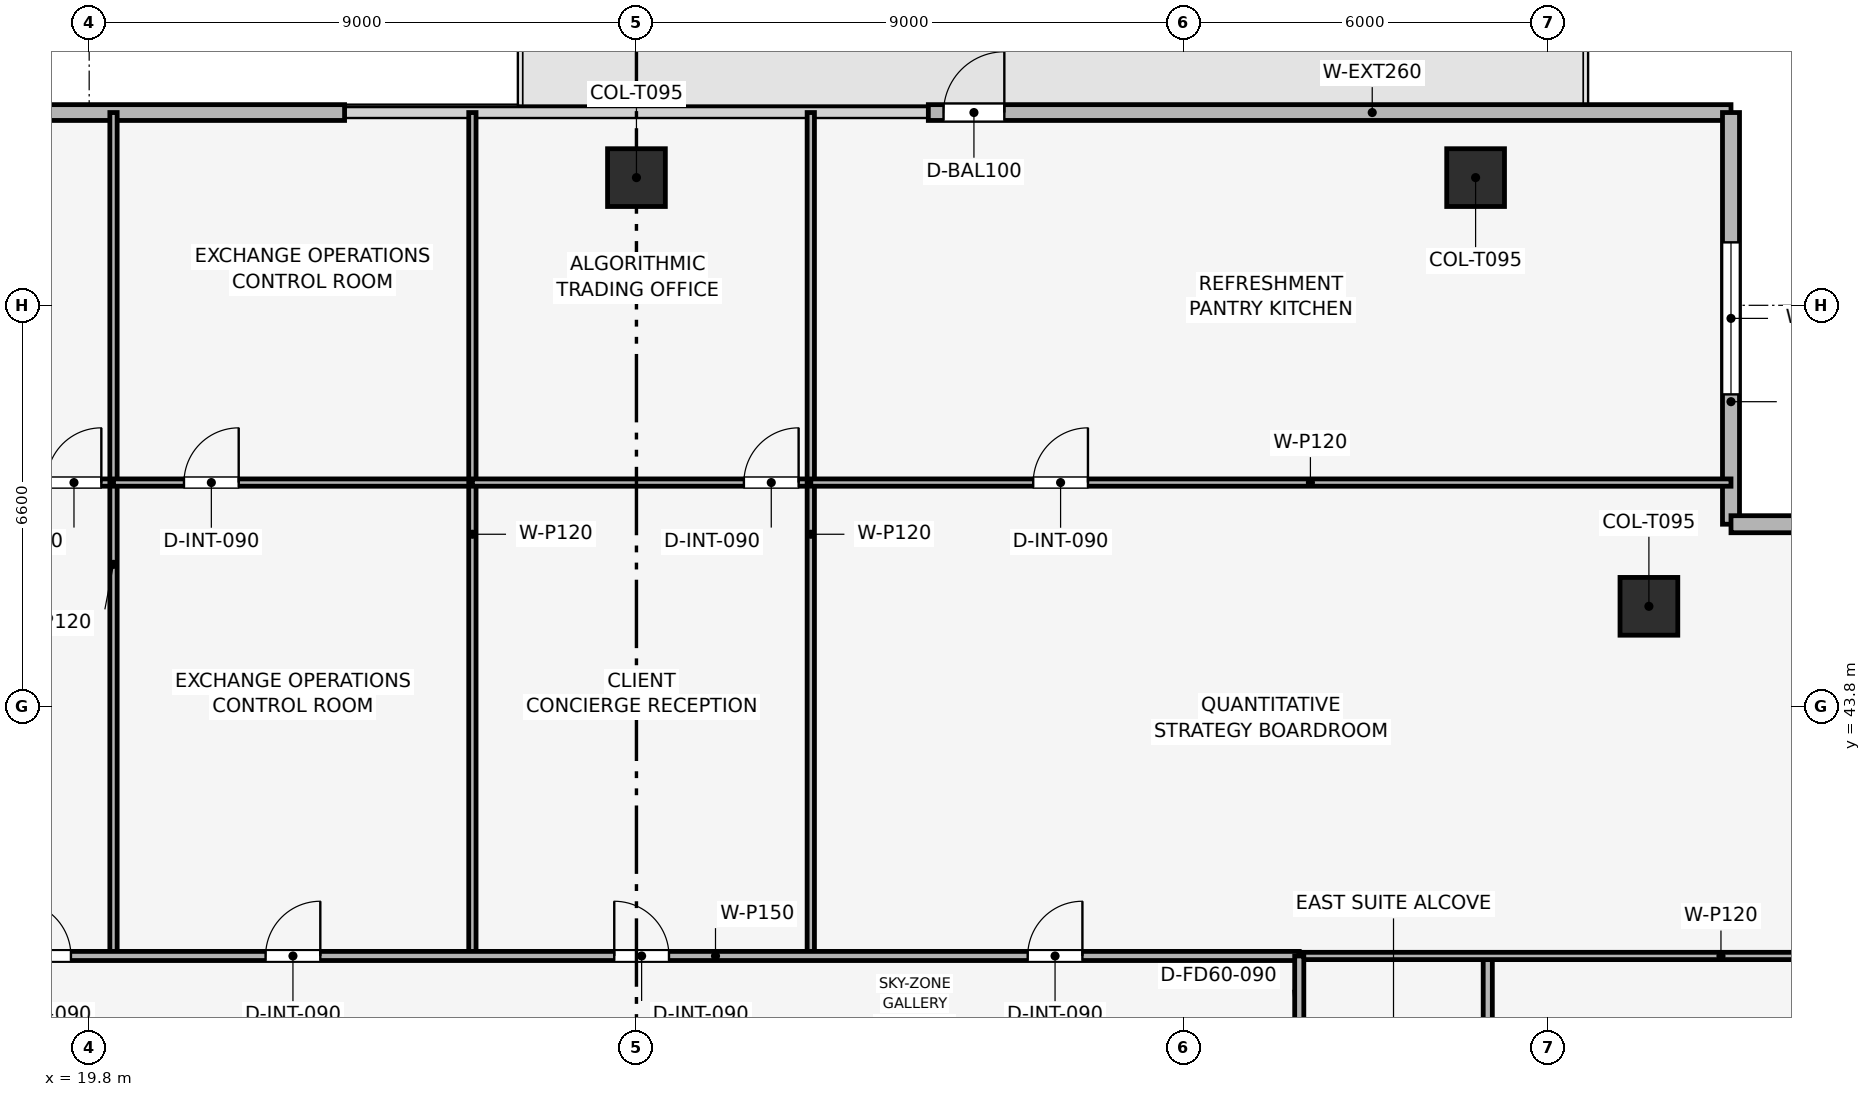
"""IFC4 building model, lengths in metres.
Left out: names, types, materials, properties, quantities, classifications, styles, units other than length and angle.
Written with IfcOpenShell. Run it as: python <this file> out.ifc"""

import sys

from ifc_helpers import new_model, si_unit, direction, frame, frame_2d, origin, origin_2d, place, context, subcontext, project, spatial, rectangle, extrude, element, fill, save


model = new_model("IFC4")
c1 = context("Model", 3, precision=1e-05, world=origin(), true_north=direction((0.0, 1.0)))
c2 = subcontext(c1, "Body", "Model", "MODEL_VIEW")
j1 = project(units=[si_unit("LENGTHUNIT", "METRE"), si_unit("PLANEANGLEUNIT", "RADIAN")], contexts=[c1])
p1 = place(None, origin())
s1 = spatial("IfcSite", under=j1, at=p1, CompositionType="ELEMENT")
p2 = place(p1, origin())
s2 = spatial("IfcBuilding", under=s1, at=p2, CompositionType="ELEMENT")
p3 = place(p2, frame((0.0, 0.0, 254.1)))
s3 = spatial("IfcBuildingStorey", under=s2, at=p3, CompositionType="ELEMENT", Elevation=254.1)
for number, where, z_axis, x_axis in (
    (1, (42.6, 52.5, 0.003), (0.0, 0.0, 1.0), (1.0, 0.0, 0.0)),
    (2, (28.8, 52.5, 0.003), (0.0, 0.0, 1.0), (1.0, 0.0, 0.0)),
    (3, (45.45, 45.45, 0.003), (0.0, 0.0, 1.0), (1.0, 0.0, 0.0)),
):
    element("IfcColumn", number, at=place(p3, frame(where, z_axis=z_axis, x_axis=x_axis)), inside=s3, PredefinedType="COLUMN", context=c2, shape_type="SweptSolid", body=[
        extrude(rectangle(XDim=0.95, YDim=0.95, at=origin_2d()), origin(), (0.0, 0.0, 1.0), 3.494),
    ])
p4 = place(p3, frame((10.8, 53.57, 0.0), z_axis=(0.0, 0.0, 1.0), x_axis=(1.0, 0.0, 0.0)))
e4 = element("IfcWall", 4, at=p4, inside=s3, PredefinedType="SOLIDWALL", context=c2, shape_type="SweptSolid", body=[
    extrude(rectangle(XDim=13.2, YDim=0.26, at=frame_2d((6.6, 0.0))), origin(), (0.0, 0.0, 1.0), 3.5),
])
p5 = place(p4, frame((0.25, 0.0, 0.9)))
e5 = element("IfcOpeningElement", 5, at=p5, cuts=e4, PredefinedType="OPENING", context=c2, shape_type="SweptSolid", body=[
    extrude(rectangle(XDim=1.2, YDim=2.1, at=frame_2d((0.6, 1.05))), frame((0.0, 0.14, 0.0), z_axis=(0.0, -1.0, 0.0), x_axis=(1.0, 0.0, 0.0)), (0.0, 0.0, 1.0), 0.28),
])
p6 = place(p3, frame((33.6, 53.57, 0.0), z_axis=(0.0, 0.0, 1.0), x_axis=(1.0, 0.0, 0.0)))
e6 = element("IfcWall", 6, at=p6, inside=s3, PredefinedType="SOLIDWALL", context=c2, shape_type="SweptSolid", body=[
    extrude(rectangle(XDim=13.2, YDim=0.26, at=frame_2d((6.6, 0.0))), origin(), (0.0, 0.0, 1.0), 3.5),
])
p7 = place(p6, frame((0.25, 0.0, 0.0)))
e7 = element("IfcOpeningElement", 7, at=p7, cuts=e6, PredefinedType="OPENING", context=c2, shape_type="SweptSolid", body=[
    extrude(rectangle(XDim=1.0, YDim=2.2, at=frame_2d((0.5, 1.1))), frame((0.0, 0.14, 0.0), z_axis=(0.0, -1.0, 0.0), x_axis=(1.0, 0.0, 0.0)), (0.0, 0.0, 1.0), 0.28),
])
p8 = place(p3, frame((46.8, 53.57, 0.0), z_axis=(0.0, 0.0, 1.0), x_axis=(0.0, -1.0, 0.0)))
e8 = element("IfcWall", 8, at=p8, inside=s3, PredefinedType="SOLIDWALL", context=c2, shape_type="SweptSolid", body=[
    extrude(rectangle(XDim=6.77, YDim=0.28, at=frame_2d((3.385, 0.0))), origin(), (0.0, 0.0, 1.0), 3.5),
])
p9 = place(p8, frame((2.135, 0.0, 0.9)))
e9 = element("IfcOpeningElement", 9, at=p9, cuts=e8, PredefinedType="OPENING", context=c2, shape_type="SweptSolid", body=[
    extrude(rectangle(XDim=2.5, YDim=1.9, at=frame_2d((1.25, 0.95))), frame((0.0, 0.15, 0.0), z_axis=(0.0, -1.0, 0.0), x_axis=(1.0, 0.0, 0.0)), (0.0, 0.0, 1.0), 0.3),
])
p10 = place(p3, frame((46.8, 46.8, 0.0), z_axis=(0.0, 0.0, 1.0), x_axis=(1.0, 0.0, 0.0)))
e10 = element("IfcWall", 10, at=p10, inside=s3, PredefinedType="SOLIDWALL", context=c2, shape_type="SweptSolid", body=[
    extrude(rectangle(XDim=6.77, YDim=0.28, at=frame_2d((3.385, 0.0))), origin(), (0.0, 0.0, 1.0), 3.5),
])
p11 = place(p10, frame((2.135, 0.0, 0.9)))
e11 = element("IfcOpeningElement", 11, at=p11, cuts=e10, PredefinedType="OPENING", context=c2, shape_type="SweptSolid", body=[
    extrude(rectangle(XDim=2.5, YDim=1.9, at=frame_2d((1.25, 0.95))), frame((0.0, 0.15, 0.0), z_axis=(0.0, -1.0, 0.0), x_axis=(1.0, 0.0, 0.0)), (0.0, 0.0, 1.0), 0.3),
])
p12 = place(p3, frame((10.8, 47.485, 0.0), z_axis=(0.0, 0.0, 1.0), x_axis=(1.0, 0.0, 0.0)))
e12 = element("IfcWall", 12, at=p12, inside=s3, PredefinedType="PARTITIONING", context=c2, shape_type="SweptSolid", body=[
    extrude(rectangle(XDim=9.4, YDim=0.12, at=frame_2d((4.7, 0.0))), origin(), (0.0, 0.0, 1.0), 3.085),
])
p13 = place(p12, frame((8.3, 0.0, 0.0)))
e13 = element("IfcOpeningElement", 13, at=p13, cuts=e12, PredefinedType="OPENING", context=c2, shape_type="SweptSolid", body=[
    extrude(rectangle(XDim=0.9, YDim=2.1, at=frame_2d((0.45, 1.05))), frame((0.0, 0.07, 0.0), z_axis=(0.0, -1.0, 0.0), x_axis=(1.0, 0.0, 0.0)), (0.0, 0.0, 1.0), 0.14),
])
p14 = place(p3, frame((20.2, 39.7, 0.0), z_axis=(0.0, 0.0, 1.0), x_axis=(0.0, 1.0, 0.0)))
e14 = element("IfcWall", 14, at=p14, inside=s3, PredefinedType="PARTITIONING", context=c2, shape_type="SweptSolid", body=[
    extrude(rectangle(XDim=13.87, YDim=0.12, at=frame_2d((6.935, 0.0))), origin(), (0.0, 0.0, 1.0), 3.085),
])
p15 = place(p3, frame((20.2, 47.485, 0.0), z_axis=(0.0, 0.0, 1.0), x_axis=(1.0, 0.0, 0.0)))
e15 = element("IfcWall", 15, at=p15, inside=s3, PredefinedType="PARTITIONING", context=c2, shape_type="SweptSolid", body=[
    extrude(rectangle(XDim=5.902, YDim=0.12, at=frame_2d((2.951, 0.0))), origin(), (0.0, 0.0, 1.0), 3.085),
])
p16 = place(p15, frame((1.159, 0.0, 0.0)))
e16 = element("IfcOpeningElement", 16, at=p16, cuts=e15, PredefinedType="OPENING", context=c2, shape_type="SweptSolid", body=[
    extrude(rectangle(XDim=0.9, YDim=2.1, at=frame_2d((0.45, 1.05))), frame((0.0, 0.07, 0.0), z_axis=(0.0, -1.0, 0.0), x_axis=(1.0, 0.0, 0.0)), (0.0, 0.0, 1.0), 0.14),
])
p17 = place(p3, frame((26.102, 39.7, 0.0), z_axis=(0.0, 0.0, 1.0), x_axis=(0.0, 1.0, 0.0)))
e17 = element("IfcWall", 17, at=p17, inside=s3, PredefinedType="PARTITIONING", context=c2, shape_type="SweptSolid", body=[
    extrude(rectangle(XDim=13.87, YDim=0.12, at=frame_2d((6.935, 0.0))), origin(), (0.0, 0.0, 1.0), 3.085),
])
p18 = place(p3, frame((26.102, 47.485, 0.0), z_axis=(0.0, 0.0, 1.0), x_axis=(1.0, 0.0, 0.0)))
e18 = element("IfcWall", 18, at=p18, inside=s3, PredefinedType="PARTITIONING", context=c2, shape_type="SweptSolid", body=[
    extrude(rectangle(XDim=5.565, YDim=0.12, at=frame_2d((2.782, 0.0))), origin(), (0.0, 0.0, 1.0), 3.085),
])
p19 = place(p18, frame((4.465, 0.0, 0.0)))
e19 = element("IfcOpeningElement", 19, at=p19, cuts=e18, PredefinedType="OPENING", context=c2, shape_type="SweptSolid", body=[
    extrude(rectangle(XDim=0.9, YDim=2.1, at=frame_2d((0.45, 1.05))), frame((0.0, 0.07, 0.0), z_axis=(0.0, -1.0, 0.0), x_axis=(1.0, 0.0, 0.0)), (0.0, 0.0, 1.0), 0.14),
])
p20 = place(p3, frame((31.667, 39.7, 0.0), z_axis=(0.0, 0.0, 1.0), x_axis=(0.0, 1.0, 0.0)))
e20 = element("IfcWall", 20, at=p20, inside=s3, PredefinedType="PARTITIONING", context=c2, shape_type="SweptSolid", body=[
    extrude(rectangle(XDim=13.87, YDim=0.12, at=frame_2d((6.935, 0.0))), origin(), (0.0, 0.0, 1.0), 3.085),
])
p21 = place(p3, frame((31.667, 47.485, 0.0), z_axis=(0.0, 0.0, 1.0), x_axis=(1.0, 0.0, 0.0)))
e21 = element("IfcWall", 21, at=p21, inside=s3, PredefinedType="PARTITIONING", context=c2, shape_type="SweptSolid", body=[
    extrude(rectangle(XDim=15.133, YDim=0.12, at=frame_2d((7.566, 0.0))), origin(), (0.0, 0.0, 1.0), 3.085),
])
p22 = place(p21, frame((3.658, 0.0, 0.0)))
e22 = element("IfcOpeningElement", 22, at=p22, cuts=e21, PredefinedType="OPENING", context=c2, shape_type="SweptSolid", body=[
    extrude(rectangle(XDim=0.9, YDim=2.1, at=frame_2d((0.45, 1.05))), frame((0.0, 0.07, 0.0), z_axis=(0.0, -1.0, 0.0), x_axis=(1.0, 0.0, 0.0)), (0.0, 0.0, 1.0), 0.14),
])
p23 = place(p3, frame((42.8, 28.0, 0.0), z_axis=(0.0, 0.0, 1.0), x_axis=(0.0, 1.0, 0.0)))
e23 = element("IfcWall", 23, at=p23, inside=s3, PredefinedType="PARTITIONING", context=c2, shape_type="SweptSolid", body=[
    extrude(rectangle(XDim=11.7, YDim=0.15, at=frame_2d((5.85, 0.0))), origin(), (0.0, 0.0, 1.0), 3.085),
])
p24 = place(p23, frame((9.6, 0.0, 0.0)))
e24 = element("IfcOpeningElement", 24, at=p24, cuts=e23, PredefinedType="OPENING", context=c2, shape_type="SweptSolid", body=[
    extrude(rectangle(XDim=0.9, YDim=2.1, at=frame_2d((0.45, 1.05))), frame((0.0, 0.085, 0.0), z_axis=(0.0, -1.0, 0.0), x_axis=(1.0, 0.0, 0.0)), (0.0, 0.0, 1.0), 0.17),
])
p25 = place(p3, frame((39.7, 39.7, 0.0), z_axis=(0.0, 0.0, 1.0), x_axis=(1.0, 0.0, 0.0)))
e25 = element("IfcWall", 25, at=p25, inside=s3, PredefinedType="PARTITIONING", context=c2, shape_type="SweptSolid", body=[
    extrude(rectangle(XDim=13.87, YDim=0.12, at=frame_2d((6.935, 0.0))), origin(), (0.0, 0.0, 1.0), 3.085),
])
p26 = place(p3, frame((17.9, 39.7, 0.0), z_axis=(0.0, 0.0, 1.0), x_axis=(1.0, 0.0, 0.0)))
e26 = element("IfcWall", 26, at=p26, inside=s3, PredefinedType="PARTITIONING", context=c2, shape_type="SweptSolid", body=[
    extrude(rectangle(XDim=21.8, YDim=0.15, at=frame_2d((10.9, 0.0))), origin(), (0.0, 0.0, 1.0), 3.085),
])
p27 = place(p26, frame((0.7, 0.0, 0.0)))
e27 = element("IfcOpeningElement", 27, at=p27, cuts=e26, PredefinedType="OPENING", context=c2, shape_type="SweptSolid", body=[
    extrude(rectangle(XDim=0.9, YDim=2.1, at=frame_2d((0.45, 1.05))), frame((0.0, 0.085, 0.0), z_axis=(0.0, -1.0, 0.0), x_axis=(1.0, 0.0, 0.0)), (0.0, 0.0, 1.0), 0.17),
])
p28 = place(p26, frame((4.801, 0.0, 0.0)))
e28 = element("IfcOpeningElement", 28, at=p28, cuts=e26, PredefinedType="OPENING", context=c2, shape_type="SweptSolid", body=[
    extrude(rectangle(XDim=0.9, YDim=2.1, at=frame_2d((0.45, 1.05))), frame((0.0, 0.085, 0.0), z_axis=(0.0, -1.0, 0.0), x_axis=(1.0, 0.0, 0.0)), (0.0, 0.0, 1.0), 0.17),
])
p29 = place(p26, frame((10.535, 0.0, 0.0)))
e29 = element("IfcOpeningElement", 29, at=p29, cuts=e26, PredefinedType="OPENING", context=c2, shape_type="SweptSolid", body=[
    extrude(rectangle(XDim=0.9, YDim=2.1, at=frame_2d((0.45, 1.05))), frame((0.0, 0.085, 0.0), z_axis=(0.0, -1.0, 0.0), x_axis=(1.0, 0.0, 0.0)), (0.0, 0.0, 1.0), 0.17),
])
p30 = place(p26, frame((17.334, 0.0, 0.0)))
e30 = element("IfcOpeningElement", 30, at=p30, cuts=e26, PredefinedType="OPENING", context=c2, shape_type="SweptSolid", body=[
    extrude(rectangle(XDim=0.9, YDim=2.1, at=frame_2d((0.45, 1.05))), frame((0.0, 0.085, 0.0), z_axis=(0.0, -1.0, 0.0), x_axis=(1.0, 0.0, 0.0)), (0.0, 0.0, 1.0), 0.17),
])
p31 = place(p3, frame((39.7, 24.4, 0.0), z_axis=(0.0, 0.0, 1.0), x_axis=(0.0, 1.0, 0.0)))
e31 = element("IfcWall", 31, at=p31, inside=s3, PredefinedType="PARTITIONING", context=c2, shape_type="SweptSolid", body=[
    extrude(rectangle(XDim=15.3, YDim=0.15, at=frame_2d((7.65, 0.0))), origin(), (0.0, 0.0, 1.0), 3.085),
])
p32 = place(p31, frame((1.35, 0.0, 0.0)))
e32 = element("IfcOpeningElement", 32, at=p32, cuts=e31, PredefinedType="OPENING", context=c2, shape_type="SweptSolid", body=[
    extrude(rectangle(XDim=0.9, YDim=2.1, at=frame_2d((0.45, 1.05))), frame((0.0, 0.085, 0.0), z_axis=(0.0, -1.0, 0.0), x_axis=(1.0, 0.0, 0.0)), (0.0, 0.0, 1.0), 0.17),
])
p33 = place(p31, frame((4.55, 0.0, 0.0)))
e33 = element("IfcOpeningElement", 33, at=p33, cuts=e31, PredefinedType="OPENING", context=c2, shape_type="SweptSolid", body=[
    extrude(rectangle(XDim=0.9, YDim=2.1, at=frame_2d((0.45, 1.05))), frame((0.0, 0.085, 0.0), z_axis=(0.0, -1.0, 0.0), x_axis=(1.0, 0.0, 0.0)), (0.0, 0.0, 1.0), 0.17),
])
p34 = place(p31, frame((7.45, 0.0, 0.0)))
e34 = element("IfcOpeningElement", 34, at=p34, cuts=e31, PredefinedType="OPENING", context=c2, shape_type="SweptSolid", body=[
    extrude(rectangle(XDim=0.9, YDim=2.1, at=frame_2d((0.45, 1.05))), frame((0.0, 0.085, 0.0), z_axis=(0.0, -1.0, 0.0), x_axis=(1.0, 0.0, 0.0)), (0.0, 0.0, 1.0), 0.17),
])
p35 = place(p31, frame((10.2, 0.0, 0.0)))
e35 = element("IfcOpeningElement", 35, at=p35, cuts=e31, PredefinedType="OPENING", context=c2, shape_type="SweptSolid", body=[
    extrude(rectangle(XDim=0.95, YDim=2.1, at=frame_2d((0.475, 1.05))), frame((0.0, 0.085, 0.0), z_axis=(0.0, -1.0, 0.0), x_axis=(1.0, 0.0, 0.0)), (0.0, 0.0, 1.0), 0.17),
])
p36 = place(p31, frame((13.2, 0.0, 0.0)))
e36 = element("IfcOpeningElement", 36, at=p36, cuts=e31, PredefinedType="OPENING", context=c2, shape_type="SweptSolid", body=[
    extrude(rectangle(XDim=0.9, YDim=2.1, at=frame_2d((0.45, 1.05))), frame((0.0, 0.085, 0.0), z_axis=(0.0, -1.0, 0.0), x_axis=(1.0, 0.0, 0.0)), (0.0, 0.0, 1.0), 0.17),
])
p37 = place(p7, origin())
e37 = element("IfcDoor", 37, at=p37, inside=s3, OperationType="SINGLE_SWING_RIGHT", PredefinedType="DOOR", context=c2, shape_type="SweptSolid", body=[
    extrude(rectangle(XDim=1.0, YDim=2.2, at=frame_2d((0.5, 1.1))), frame((0.0, 0.025, 0.0), z_axis=(0.0, -1.0, 0.0), x_axis=(1.0, 0.0, 0.0)), (0.0, 0.0, 1.0), 0.05),
])
fill(e7, e37)
p38 = place(p9, origin())
e38 = element("IfcWindow", 38, at=p38, inside=s3, PartitioningType="SINGLE_PANEL", PredefinedType="WINDOW", context=c2, shape_type="SweptSolid", body=[
    extrude(rectangle(XDim=2.5, YDim=1.9, at=frame_2d((1.25, 0.95))), frame((0.0, 0.03, 0.0), z_axis=(0.0, -1.0, 0.0), x_axis=(1.0, 0.0, 0.0)), (0.0, 0.0, 1.0), 0.06),
])
fill(e9, e38)
p39 = place(p13, origin())
e39 = element("IfcDoor", 39, at=p39, inside=s3, OperationType="SINGLE_SWING_RIGHT", PredefinedType="DOOR", context=c2, shape_type="SweptSolid", body=[
    extrude(rectangle(XDim=0.9, YDim=2.1, at=frame_2d((0.45, 1.05))), frame((0.0, 0.025, 0.0), z_axis=(0.0, -1.0, 0.0), x_axis=(1.0, 0.0, 0.0)), (0.0, 0.0, 1.0), 0.05),
])
fill(e13, e39)
p40 = place(p16, origin())
e40 = element("IfcDoor", 40, at=p40, inside=s3, OperationType="SINGLE_SWING_RIGHT", PredefinedType="DOOR", context=c2, shape_type="SweptSolid", body=[
    extrude(rectangle(XDim=0.9, YDim=2.1, at=frame_2d((0.45, 1.05))), frame((0.0, 0.025, 0.0), z_axis=(0.0, -1.0, 0.0), x_axis=(1.0, 0.0, 0.0)), (0.0, 0.0, 1.0), 0.05),
])
fill(e16, e40)
p41 = place(p19, origin())
e41 = element("IfcDoor", 41, at=p41, inside=s3, OperationType="SINGLE_SWING_RIGHT", PredefinedType="DOOR", context=c2, shape_type="SweptSolid", body=[
    extrude(rectangle(XDim=0.9, YDim=2.1, at=frame_2d((0.45, 1.05))), frame((0.0, 0.025, 0.0), z_axis=(0.0, -1.0, 0.0), x_axis=(1.0, 0.0, 0.0)), (0.0, 0.0, 1.0), 0.05),
])
fill(e19, e41)
p42 = place(p22, origin())
e42 = element("IfcDoor", 42, at=p42, inside=s3, OperationType="SINGLE_SWING_RIGHT", PredefinedType="DOOR", context=c2, shape_type="SweptSolid", body=[
    extrude(rectangle(XDim=0.9, YDim=2.1, at=frame_2d((0.45, 1.05))), frame((0.0, 0.025, 0.0), z_axis=(0.0, -1.0, 0.0), x_axis=(1.0, 0.0, 0.0)), (0.0, 0.0, 1.0), 0.05),
])
fill(e22, e42)
p43 = place(p27, origin())
e43 = element("IfcDoor", 43, at=p43, inside=s3, OperationType="SINGLE_SWING_LEFT", PredefinedType="DOOR", context=c2, shape_type="SweptSolid", body=[
    extrude(rectangle(XDim=0.9, YDim=2.1, at=frame_2d((0.45, 1.05))), frame((0.0, 0.025, 0.0), z_axis=(0.0, -1.0, 0.0), x_axis=(1.0, 0.0, 0.0)), (0.0, 0.0, 1.0), 0.05),
])
fill(e27, e43)
p44 = place(p28, origin())
e44 = element("IfcDoor", 44, at=p44, inside=s3, OperationType="SINGLE_SWING_RIGHT", PredefinedType="DOOR", context=c2, shape_type="SweptSolid", body=[
    extrude(rectangle(XDim=0.9, YDim=2.1, at=frame_2d((0.45, 1.05))), frame((0.0, 0.025, 0.0), z_axis=(0.0, -1.0, 0.0), x_axis=(1.0, 0.0, 0.0)), (0.0, 0.0, 1.0), 0.05),
])
fill(e28, e44)
p45 = place(p29, origin())
e45 = element("IfcDoor", 45, at=p45, inside=s3, OperationType="SINGLE_SWING_LEFT", PredefinedType="DOOR", context=c2, shape_type="SweptSolid", body=[
    extrude(rectangle(XDim=0.9, YDim=2.1, at=frame_2d((0.45, 1.05))), frame((0.0, 0.025, 0.0), z_axis=(0.0, -1.0, 0.0), x_axis=(1.0, 0.0, 0.0)), (0.0, 0.0, 1.0), 0.05),
])
fill(e29, e45)
p46 = place(p30, origin())
e46 = element("IfcDoor", 46, at=p46, inside=s3, OperationType="SINGLE_SWING_RIGHT", PredefinedType="DOOR", context=c2, shape_type="SweptSolid", body=[
    extrude(rectangle(XDim=0.9, YDim=2.1, at=frame_2d((0.45, 1.05))), frame((0.0, 0.025, 0.0), z_axis=(0.0, -1.0, 0.0), x_axis=(1.0, 0.0, 0.0)), (0.0, 0.0, 1.0), 0.05),
])
fill(e30, e46)
save(model, sys.argv[1])
